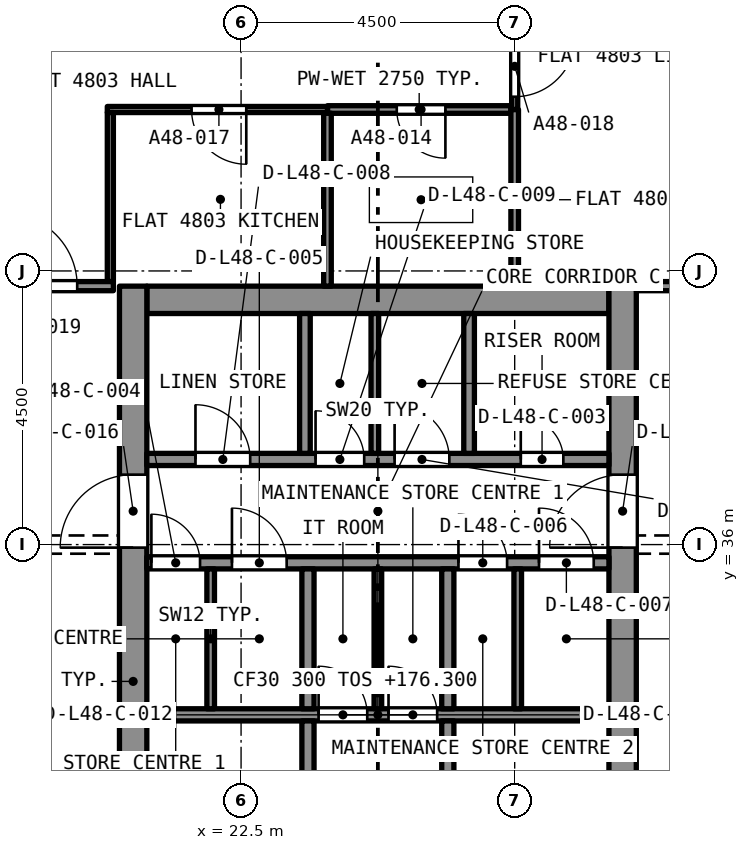
"""IFC4 building model, lengths in metres.
Left out: names, types, materials, properties, quantities, classifications, styles, units other than length and angle.
Written with IfcOpenShell. Run it as: python <this file> out.ifc"""

import sys

from ifc_helpers import new_model, si_unit, direction, frame, frame_2d, origin, place, context, subcontext, project, spatial, rectangle, extrude, element, fill, save


model = new_model("IFC4")
c1 = context("Model", 3, precision=1e-05, world=origin(), true_north=direction((0.0, 1.0)))
c2 = subcontext(c1, "Body", "Model", "MODEL_VIEW")
j1 = project(units=[si_unit("LENGTHUNIT", "METRE"), si_unit("PLANEANGLEUNIT", "RADIAN")], contexts=[c1])
p1 = place(None, origin())
s1 = spatial("IfcSite", under=j1, at=p1, CompositionType="ELEMENT")
p2 = place(p1, origin())
s2 = spatial("IfcBuilding", under=s1, at=p2, CompositionType="ELEMENT")
p3 = place(p2, frame((0.0, 0.0, 176.3)))
s3 = spatial("IfcBuildingStorey", under=s2, at=p3, CompositionType="ELEMENT", Elevation=176.3)
p4 = place(p3, frame((20.95, 40.025, 0.0), z_axis=(0.0, 0.0, 1.0), x_axis=(1.0, 0.0, 0.0)))
e1 = element("IfcWall", 1, at=p4, inside=s3, PredefinedType="SOLIDWALL", context=c2, shape_type="SweptSolid", body=[
    extrude(rectangle(XDim=7.6, YDim=0.45, at=frame_2d((3.8, 0.0))), origin(), (0.0, 0.0, 1.0), 3.2),
])
p5 = place(p3, frame((20.725, 27.25, 0.0), z_axis=(0.0, 0.0, 1.0), x_axis=(0.0, 1.0, 0.0)))
e2 = element("IfcWall", 2, at=p5, inside=s3, PredefinedType="SOLIDWALL", context=c2, shape_type="SweptSolid", body=[
    extrude(rectangle(XDim=13.0, YDim=0.45, at=frame_2d((6.5, 0.0))), origin(), (0.0, 0.0, 1.0), 3.2),
])
p6 = place(p5, frame((8.7, 0.0, 0.0)))
e3 = element("IfcOpeningElement", 3, at=p6, cuts=e2, PredefinedType="OPENING", context=c2, shape_type="SweptSolid", body=[
    extrude(rectangle(XDim=1.2, YDim=2.1, at=frame_2d((0.6, 1.05))), frame((0.0, 0.235, 0.0), z_axis=(0.0, -1.0, 0.0), x_axis=(1.0, 0.0, 0.0)), (0.0, 0.0, 1.0), 0.47),
])
p7 = place(p3, frame((28.775, 27.25, 0.0), z_axis=(0.0, 0.0, 1.0), x_axis=(0.0, 1.0, 0.0)))
e4 = element("IfcWall", 4, at=p7, inside=s3, PredefinedType="SOLIDWALL", context=c2, shape_type="SweptSolid", body=[
    extrude(rectangle(XDim=13.0, YDim=0.45, at=frame_2d((6.5, 0.0))), origin(), (0.0, 0.0, 1.0), 3.2),
])
p8 = place(p7, frame((8.7, 0.0, 0.0)))
e5 = element("IfcOpeningElement", 5, at=p8, cuts=e4, PredefinedType="OPENING", context=c2, shape_type="SweptSolid", body=[
    extrude(rectangle(XDim=1.2, YDim=2.1, at=frame_2d((0.6, 1.05))), frame((0.0, 0.235, 0.0), z_axis=(0.0, -1.0, 0.0), x_axis=(1.0, 0.0, 0.0)), (0.0, 0.0, 1.0), 0.47),
])
p9 = place(p3, frame((26.938, 43.155, 0.0), z_axis=(0.0, 0.0, 1.0), x_axis=(-1.0, 0.0, 0.0)))
e6 = element("IfcWall", 6, at=p9, inside=s3, PredefinedType="PARTITIONING", context=c2, shape_type="SweptSolid", body=[
    extrude(rectangle(XDim=3.016, YDim=0.125, at=frame_2d((1.508, 0.0))), origin(), (0.0, 0.0, 1.0), 2.75),
])
p10 = place(p9, frame((1.077, 0.0, 0.0)))
e7 = element("IfcOpeningElement", 7, at=p10, cuts=e6, PredefinedType="OPENING", context=c2, shape_type="SweptSolid", body=[
    extrude(rectangle(XDim=0.8, YDim=2.1, at=frame_2d((0.4, 1.05))), frame((0.0, 0.073, 0.0), z_axis=(0.0, -1.0, 0.0), x_axis=(1.0, 0.0, 0.0)), (0.0, 0.0, 1.0), 0.145),
])
p11 = place(p3, frame((23.921, 40.25, 0.0), z_axis=(0.0, 0.0, 1.0), x_axis=(0.0, 1.0, 0.0)))
e8 = element("IfcWall", 8, at=p11, inside=s3, PredefinedType="PARTITIONING", context=c2, shape_type="SweptSolid", body=[
    extrude(rectangle(XDim=2.843, YDim=0.125, at=frame_2d((1.421, 0.0))), origin(), (0.0, 0.0, 1.0), 2.75),
])
p12 = place(p3, frame((27.0, 40.25, 0.0), z_axis=(0.0, 0.0, 1.0), x_axis=(0.0, 1.0, 0.0)))
e9 = element("IfcWall", 9, at=p12, inside=s3, PredefinedType="PARTITIONING", context=c2, shape_type="SweptSolid", body=[
    extrude(rectangle(XDim=2.905, YDim=0.125, at=frame_2d((1.453, 0.0))), origin(), (0.0, 0.0, 1.0), 2.75),
])
p13 = place(p3, frame((23.921, 43.155, 0.0), z_axis=(0.0, 0.0, 1.0), x_axis=(-1.0, 0.0, 0.0)))
e10 = element("IfcWall", 10, at=p13, inside=s3, PredefinedType="PARTITIONING", context=c2, shape_type="SweptSolid", body=[
    extrude(rectangle(XDim=3.621, YDim=0.1, at=frame_2d((1.811, 0.0))), origin(), (0.0, 0.0, 1.0), 2.75),
])
p14 = place(p13, frame((1.335, 0.0, 0.0)))
e11 = element("IfcOpeningElement", 11, at=p14, cuts=e10, PredefinedType="OPENING", context=c2, shape_type="SweptSolid", body=[
    extrude(rectangle(XDim=0.9, YDim=2.1, at=frame_2d((0.45, 1.05))), frame((0.0, 0.06, 0.0), z_axis=(0.0, -1.0, 0.0), x_axis=(1.0, 0.0, 0.0)), (0.0, 0.0, 1.0), 0.12),
])
p15 = place(p3, frame((20.35, 40.325, 0.0), z_axis=(0.0, 0.0, 1.0), x_axis=(0.0, 1.0, 0.0)))
e12 = element("IfcWall", 12, at=p15, inside=s3, PredefinedType="PARTITIONING", context=c2, shape_type="SweptSolid", body=[
    extrude(rectangle(XDim=2.78, YDim=0.1, at=frame_2d((1.39, 0.0))), origin(), (0.0, 0.0, 1.0), 2.75),
])
p16 = place(p3, frame((27.0, 44.575, 0.0), z_axis=(0.0, 0.0, 1.0), x_axis=(0.0, -1.0, 0.0)))
e13 = element("IfcWall", 13, at=p16, inside=s3, PredefinedType="PARTITIONING", context=c2, shape_type="SweptSolid", body=[
    extrude(rectangle(XDim=1.42, YDim=0.1, at=frame_2d((0.71, 0.0))), origin(), (0.0, 0.0, 1.0), 2.75),
])
p17 = place(p16, frame((0.21, 0.0, 0.0)))
e14 = element("IfcOpeningElement", 14, at=p17, cuts=e13, PredefinedType="OPENING", context=c2, shape_type="SweptSolid", body=[
    extrude(rectangle(XDim=1.0, YDim=2.1, at=frame_2d((0.5, 1.05))), frame((0.0, 0.06, 0.0), z_axis=(0.0, -1.0, 0.0), x_axis=(1.0, 0.0, 0.0)), (0.0, 0.0, 1.0), 0.12),
])
p18 = place(p3, frame((18.475, 40.25, 0.0), z_axis=(0.0, 0.0, 1.0), x_axis=(1.0, 0.0, 0.0)))
e15 = element("IfcWall", 15, at=p18, inside=s3, PredefinedType="PARTITIONING", context=c2, shape_type="SweptSolid", body=[
    extrude(rectangle(XDim=1.925, YDim=0.15, at=frame_2d((0.962, 0.0))), origin(), (0.0, 0.0, 1.0), 2.75),
])
p19 = place(p18, frame((0.13, 0.0, 0.0)))
e16 = element("IfcOpeningElement", 16, at=p19, cuts=e15, PredefinedType="OPENING", context=c2, shape_type="SweptSolid", body=[
    extrude(rectangle(XDim=1.2, YDim=2.4, at=frame_2d((0.6, 1.2))), frame((0.0, 0.085, 0.0), z_axis=(0.0, -1.0, 0.0), x_axis=(1.0, 0.0, 0.0)), (0.0, 0.0, 1.0), 0.17),
])
p20 = place(p3, frame((29.0, 40.25, 0.0), z_axis=(0.0, 0.0, 1.0), x_axis=(1.0, 0.0, 0.0)))
e17 = element("IfcWall", 17, at=p20, inside=s3, PredefinedType="PARTITIONING", context=c2, shape_type="SweptSolid", body=[
    extrude(rectangle(XDim=2.025, YDim=0.15, at=frame_2d((1.012, 0.0))), origin(), (0.0, 0.0, 1.0), 2.75),
])
p21 = place(p3, frame((20.95, 33.2, 0.0), z_axis=(0.0, 0.0, 1.0), x_axis=(1.0, 0.0, 0.0)))
e18 = element("IfcWall", 18, at=p21, inside=s3, PredefinedType="SOLIDWALL", context=c2, shape_type="SweptSolid", body=[
    extrude(rectangle(XDim=7.6, YDim=0.2, at=frame_2d((3.8, 0.0))), origin(), (0.0, 0.0, 1.0), 2.9),
])
p22 = place(p21, frame((2.825, 0.0, 0.0)))
e19 = element("IfcOpeningElement", 19, at=p22, cuts=e18, PredefinedType="OPENING", context=c2, shape_type="SweptSolid", body=[
    extrude(rectangle(XDim=0.8, YDim=2.1, at=frame_2d((0.4, 1.05))), frame((0.0, 0.11, 0.0), z_axis=(0.0, -1.0, 0.0), x_axis=(1.0, 0.0, 0.0)), (0.0, 0.0, 1.0), 0.22),
])
p23 = place(p21, frame((3.975, 0.0, 0.0)))
e20 = element("IfcOpeningElement", 20, at=p23, cuts=e18, PredefinedType="OPENING", context=c2, shape_type="SweptSolid", body=[
    extrude(rectangle(XDim=0.8, YDim=2.1, at=frame_2d((0.4, 1.05))), frame((0.0, 0.11, 0.0), z_axis=(0.0, -1.0, 0.0), x_axis=(1.0, 0.0, 0.0)), (0.0, 0.0, 1.0), 0.22),
])
p24 = place(p3, frame((20.95, 35.7, 0.0), z_axis=(0.0, 0.0, 1.0), x_axis=(1.0, 0.0, 0.0)))
e21 = element("IfcWall", 21, at=p24, inside=s3, PredefinedType="SOLIDWALL", context=c2, shape_type="SweptSolid", body=[
    extrude(rectangle(XDim=7.6, YDim=0.2, at=frame_2d((3.8, 0.0))), origin(), (0.0, 0.0, 1.0), 2.9),
])
p25 = place(p24, frame((0.075, 0.0, 0.0)))
e22 = element("IfcOpeningElement", 22, at=p25, cuts=e21, PredefinedType="OPENING", context=c2, shape_type="SweptSolid", body=[
    extrude(rectangle(XDim=0.8, YDim=2.1, at=frame_2d((0.4, 1.05))), frame((0.0, 0.11, 0.0), z_axis=(0.0, -1.0, 0.0), x_axis=(1.0, 0.0, 0.0)), (0.0, 0.0, 1.0), 0.22),
])
p26 = place(p24, frame((1.4, 0.0, 0.0)))
e23 = element("IfcOpeningElement", 23, at=p26, cuts=e21, PredefinedType="OPENING", context=c2, shape_type="SweptSolid", body=[
    extrude(rectangle(XDim=0.9, YDim=2.1, at=frame_2d((0.45, 1.05))), frame((0.0, 0.11, 0.0), z_axis=(0.0, -1.0, 0.0), x_axis=(1.0, 0.0, 0.0)), (0.0, 0.0, 1.0), 0.22),
])
p27 = place(p24, frame((5.125, 0.0, 0.0)))
e24 = element("IfcOpeningElement", 24, at=p27, cuts=e21, PredefinedType="OPENING", context=c2, shape_type="SweptSolid", body=[
    extrude(rectangle(XDim=0.8, YDim=2.1, at=frame_2d((0.4, 1.05))), frame((0.0, 0.11, 0.0), z_axis=(0.0, -1.0, 0.0), x_axis=(1.0, 0.0, 0.0)), (0.0, 0.0, 1.0), 0.22),
])
p28 = place(p24, frame((6.45, 0.0, 0.0)))
e25 = element("IfcOpeningElement", 25, at=p28, cuts=e21, PredefinedType="OPENING", context=c2, shape_type="SweptSolid", body=[
    extrude(rectangle(XDim=0.9, YDim=2.1, at=frame_2d((0.45, 1.05))), frame((0.0, 0.11, 0.0), z_axis=(0.0, -1.0, 0.0), x_axis=(1.0, 0.0, 0.0)), (0.0, 0.0, 1.0), 0.22),
])
p29 = place(p3, frame((20.95, 37.4, 0.0), z_axis=(0.0, 0.0, 1.0), x_axis=(1.0, 0.0, 0.0)))
e26 = element("IfcWall", 26, at=p29, inside=s3, PredefinedType="SOLIDWALL", context=c2, shape_type="SweptSolid", body=[
    extrude(rectangle(XDim=7.6, YDim=0.2, at=frame_2d((3.8, 0.0))), origin(), (0.0, 0.0, 1.0), 2.9),
])
p30 = place(p29, frame((6.15, 0.0, 0.0)))
e27 = element("IfcOpeningElement", 27, at=p30, cuts=e26, PredefinedType="OPENING", context=c2, shape_type="SweptSolid", body=[
    extrude(rectangle(XDim=0.7, YDim=2.1, at=frame_2d((0.35, 1.05))), frame((0.0, 0.11, 0.0), z_axis=(0.0, -1.0, 0.0), x_axis=(1.0, 0.0, 0.0)), (0.0, 0.0, 1.0), 0.22),
])
p31 = place(p29, frame((0.8, 0.0, 0.0)))
e28 = element("IfcOpeningElement", 28, at=p31, cuts=e26, PredefinedType="OPENING", context=c2, shape_type="SweptSolid", body=[
    extrude(rectangle(XDim=0.9, YDim=2.1, at=frame_2d((0.45, 1.05))), frame((0.0, 0.11, 0.0), z_axis=(0.0, -1.0, 0.0), x_axis=(1.0, 0.0, 0.0)), (0.0, 0.0, 1.0), 0.22),
])
p32 = place(p29, frame((2.775, 0.0, 0.0)))
e29 = element("IfcOpeningElement", 29, at=p32, cuts=e26, PredefinedType="OPENING", context=c2, shape_type="SweptSolid", body=[
    extrude(rectangle(XDim=0.8, YDim=2.1, at=frame_2d((0.4, 1.05))), frame((0.0, 0.11, 0.0), z_axis=(0.0, -1.0, 0.0), x_axis=(1.0, 0.0, 0.0)), (0.0, 0.0, 1.0), 0.22),
])
p33 = place(p29, frame((4.075, 0.0, 0.0)))
e30 = element("IfcOpeningElement", 30, at=p33, cuts=e26, PredefinedType="OPENING", context=c2, shape_type="SweptSolid", body=[
    extrude(rectangle(XDim=0.9, YDim=2.1, at=frame_2d((0.45, 1.05))), frame((0.0, 0.11, 0.0), z_axis=(0.0, -1.0, 0.0), x_axis=(1.0, 0.0, 0.0)), (0.0, 0.0, 1.0), 0.22),
])
p34 = place(p3, frame((23.6, 27.7, 0.0), z_axis=(0.0, 0.0, 1.0), x_axis=(0.0, 1.0, 0.0)))
e31 = element("IfcWall", 31, at=p34, inside=s3, PredefinedType="SOLIDWALL", context=c2, shape_type="SweptSolid", body=[
    extrude(rectangle(XDim=5.4, YDim=0.2, at=frame_2d((2.7, 0.0))), origin(), (0.0, 0.0, 1.0), 2.9),
])
p35 = place(p34, frame((0.2, 0.0, 0.0)))
e32 = element("IfcOpeningElement", 32, at=p35, cuts=e31, PredefinedType="OPENING", context=c2, shape_type="SweptSolid", body=[
    extrude(rectangle(XDim=0.9, YDim=2.1, at=frame_2d((0.45, 1.05))), frame((0.0, 0.11, 0.0), z_axis=(0.0, -1.0, 0.0), x_axis=(1.0, 0.0, 0.0)), (0.0, 0.0, 1.0), 0.22),
])
p36 = place(p3, frame((25.9, 27.7, 0.0), z_axis=(0.0, 0.0, 1.0), x_axis=(0.0, 1.0, 0.0)))
e33 = element("IfcWall", 33, at=p36, inside=s3, PredefinedType="SOLIDWALL", context=c2, shape_type="SweptSolid", body=[
    extrude(rectangle(XDim=5.4, YDim=0.2, at=frame_2d((2.7, 0.0))), origin(), (0.0, 0.0, 1.0), 2.9),
])
p37 = place(p36, frame((0.2, 0.0, 0.0)))
e34 = element("IfcOpeningElement", 34, at=p37, cuts=e33, PredefinedType="OPENING", context=c2, shape_type="SweptSolid", body=[
    extrude(rectangle(XDim=0.9, YDim=2.1, at=frame_2d((0.45, 1.05))), frame((0.0, 0.11, 0.0), z_axis=(0.0, -1.0, 0.0), x_axis=(1.0, 0.0, 0.0)), (0.0, 0.0, 1.0), 0.22),
])
for number, where, z_axis, x_axis in (
    (35, (23.6, 33.3, 0.0), (0.0, 0.0, 1.0), (0.0, 1.0, 0.0)),
    (36, (25.9, 33.3, 0.0), (0.0, 0.0, 1.0), (0.0, 1.0, 0.0)),
):
    element("IfcWall", number, at=place(p3, frame(where, z_axis=z_axis, x_axis=x_axis)), inside=s3, PredefinedType="SOLIDWALL", context=c2, shape_type="SweptSolid", body=[
        extrude(rectangle(XDim=2.3, YDim=0.2, at=frame_2d((1.15, 0.0))), origin(), (0.0, 0.0, 1.0), 2.9),
    ])
for number, where, z_axis, x_axis in (
    (37, (23.55, 37.5, 0.0), (0.0, 0.0, 1.0), (0.0, 1.0, 0.0)),
    (38, (26.25, 37.5, 0.0), (0.0, 0.0, 1.0), (0.0, 1.0, 0.0)),
):
    element("IfcWall", number, at=place(p3, frame(where, z_axis=z_axis, x_axis=x_axis)), inside=s3, PredefinedType="SOLIDWALL", context=c2, shape_type="SweptSolid", body=[
        extrude(rectangle(XDim=2.3, YDim=0.175, at=frame_2d((1.15, 0.0))), origin(), (0.0, 0.0, 1.0), 2.9),
    ])
for number, where, z_axis, x_axis in (
    (39, (22.0, 33.3, 0.0), (0.0, 0.0, 1.0), (0.0, 1.0, 0.0)),
    (40, (27.05, 33.3, 0.0), (0.0, 0.0, 1.0), (0.0, 1.0, 0.0)),
    (41, (24.7, 37.5, 0.0), (0.0, 0.0, 1.0), (0.0, 1.0, 0.0)),
    (42, (24.75, 33.3, 0.0), (0.0, 0.0, 1.0), (0.0, 1.0, 0.0)),
):
    element("IfcWall", number, at=place(p3, frame(where, z_axis=z_axis, x_axis=x_axis)), inside=s3, PredefinedType="PARTITIONING", context=c2, shape_type="SweptSolid", body=[
        extrude(rectangle(XDim=2.3, YDim=0.125, at=frame_2d((1.15, 0.0))), origin(), (0.0, 0.0, 1.0), 2.9),
    ])
p38 = place(p10, origin())
e43 = element("IfcDoor", 43, at=p38, inside=s3, OperationType="SINGLE_SWING_LEFT", PredefinedType="DOOR", context=c2, shape_type="SweptSolid", body=[
    extrude(rectangle(XDim=0.8, YDim=2.1, at=frame_2d((0.4, 1.05))), frame((0.0, 0.025, 0.0), z_axis=(0.0, -1.0, 0.0), x_axis=(1.0, 0.0, 0.0)), (0.0, 0.0, 1.0), 0.05),
])
fill(e7, e43)
p39 = place(p14, origin())
e44 = element("IfcDoor", 44, at=p39, inside=s3, OperationType="SINGLE_SWING_LEFT", PredefinedType="DOOR", context=c2, shape_type="SweptSolid", body=[
    extrude(rectangle(XDim=0.9, YDim=2.1, at=frame_2d((0.45, 1.05))), frame((0.0, 0.025, 0.0), z_axis=(0.0, -1.0, 0.0), x_axis=(1.0, 0.0, 0.0)), (0.0, 0.0, 1.0), 0.05),
])
fill(e11, e44)
p40 = place(p17, origin())
e45 = element("IfcDoor", 45, at=p40, inside=s3, OperationType="SINGLE_SWING_RIGHT", PredefinedType="DOOR", context=c2, shape_type="SweptSolid", body=[
    extrude(rectangle(XDim=1.0, YDim=2.1, at=frame_2d((0.5, 1.05))), frame((0.0, 0.025, 0.0), z_axis=(0.0, -1.0, 0.0), x_axis=(1.0, 0.0, 0.0)), (0.0, 0.0, 1.0), 0.05),
])
fill(e14, e45)
p41 = place(p19, origin())
e46 = element("IfcDoor", 46, at=p41, inside=s3, OperationType="SINGLE_SWING_LEFT", PredefinedType="DOOR", context=c2, shape_type="SweptSolid", body=[
    extrude(rectangle(XDim=1.2, YDim=2.4, at=frame_2d((0.6, 1.2))), frame((0.0, 0.025, 0.0), z_axis=(0.0, -1.0, 0.0), x_axis=(1.0, 0.0, 0.0)), (0.0, 0.0, 1.0), 0.05),
])
fill(e16, e46)
p42 = place(p30, origin())
e47 = element("IfcDoor", 47, at=p42, inside=s3, OperationType="SINGLE_SWING_LEFT", PredefinedType="DOOR", context=c2, shape_type="SweptSolid", body=[
    extrude(rectangle(XDim=0.7, YDim=2.1, at=frame_2d((0.35, 1.05))), frame((0.0, 0.025, 0.0), z_axis=(0.0, -1.0, 0.0), x_axis=(1.0, 0.0, 0.0)), (0.0, 0.0, 1.0), 0.05),
])
fill(e27, e47)
p43 = place(p25, origin())
e48 = element("IfcDoor", 48, at=p43, inside=s3, OperationType="SINGLE_SWING_LEFT", PredefinedType="DOOR", context=c2, shape_type="SweptSolid", body=[
    extrude(rectangle(XDim=0.8, YDim=2.1, at=frame_2d((0.4, 1.05))), frame((0.0, 0.025, 0.0), z_axis=(0.0, -1.0, 0.0), x_axis=(1.0, 0.0, 0.0)), (0.0, 0.0, 1.0), 0.05),
])
fill(e22, e48)
p44 = place(p26, origin())
e49 = element("IfcDoor", 49, at=p44, inside=s3, OperationType="SINGLE_SWING_LEFT", PredefinedType="DOOR", context=c2, shape_type="SweptSolid", body=[
    extrude(rectangle(XDim=0.9, YDim=2.1, at=frame_2d((0.45, 1.05))), frame((0.0, 0.025, 0.0), z_axis=(0.0, -1.0, 0.0), x_axis=(1.0, 0.0, 0.0)), (0.0, 0.0, 1.0), 0.05),
])
fill(e23, e49)
p45 = place(p27, origin())
e50 = element("IfcDoor", 50, at=p45, inside=s3, OperationType="SINGLE_SWING_LEFT", PredefinedType="DOOR", context=c2, shape_type="SweptSolid", body=[
    extrude(rectangle(XDim=0.8, YDim=2.1, at=frame_2d((0.4, 1.05))), frame((0.0, 0.025, 0.0), z_axis=(0.0, -1.0, 0.0), x_axis=(1.0, 0.0, 0.0)), (0.0, 0.0, 1.0), 0.05),
])
fill(e24, e50)
p46 = place(p28, origin())
e51 = element("IfcDoor", 51, at=p46, inside=s3, OperationType="SINGLE_SWING_LEFT", PredefinedType="DOOR", context=c2, shape_type="SweptSolid", body=[
    extrude(rectangle(XDim=0.9, YDim=2.1, at=frame_2d((0.45, 1.05))), frame((0.0, 0.025, 0.0), z_axis=(0.0, -1.0, 0.0), x_axis=(1.0, 0.0, 0.0)), (0.0, 0.0, 1.0), 0.05),
])
fill(e25, e51)
p47 = place(p31, origin())
e52 = element("IfcDoor", 52, at=p47, inside=s3, OperationType="SINGLE_SWING_LEFT", PredefinedType="DOOR", context=c2, shape_type="SweptSolid", body=[
    extrude(rectangle(XDim=0.9, YDim=2.1, at=frame_2d((0.45, 1.05))), frame((0.0, 0.025, 0.0), z_axis=(0.0, -1.0, 0.0), x_axis=(1.0, 0.0, 0.0)), (0.0, 0.0, 1.0), 0.05),
])
fill(e28, e52)
p48 = place(p32, origin())
e53 = element("IfcDoor", 53, at=p48, inside=s3, OperationType="SINGLE_SWING_LEFT", PredefinedType="DOOR", context=c2, shape_type="SweptSolid", body=[
    extrude(rectangle(XDim=0.8, YDim=2.1, at=frame_2d((0.4, 1.05))), frame((0.0, 0.025, 0.0), z_axis=(0.0, -1.0, 0.0), x_axis=(1.0, 0.0, 0.0)), (0.0, 0.0, 1.0), 0.05),
])
fill(e29, e53)
p49 = place(p33, origin())
e54 = element("IfcDoor", 54, at=p49, inside=s3, OperationType="SINGLE_SWING_LEFT", PredefinedType="DOOR", context=c2, shape_type="SweptSolid", body=[
    extrude(rectangle(XDim=0.9, YDim=2.1, at=frame_2d((0.45, 1.05))), frame((0.0, 0.025, 0.0), z_axis=(0.0, -1.0, 0.0), x_axis=(1.0, 0.0, 0.0)), (0.0, 0.0, 1.0), 0.05),
])
fill(e30, e54)
p50 = place(p22, origin())
e55 = element("IfcDoor", 55, at=p50, inside=s3, OperationType="SINGLE_SWING_LEFT", PredefinedType="DOOR", context=c2, shape_type="SweptSolid", body=[
    extrude(rectangle(XDim=0.8, YDim=2.1, at=frame_2d((0.4, 1.05))), frame((0.0, 0.025, 0.0), z_axis=(0.0, -1.0, 0.0), x_axis=(1.0, 0.0, 0.0)), (0.0, 0.0, 1.0), 0.05),
])
fill(e19, e55)
p51 = place(p23, origin())
e56 = element("IfcDoor", 56, at=p51, inside=s3, OperationType="SINGLE_SWING_LEFT", PredefinedType="DOOR", context=c2, shape_type="SweptSolid", body=[
    extrude(rectangle(XDim=0.8, YDim=2.1, at=frame_2d((0.4, 1.05))), frame((0.0, 0.025, 0.0), z_axis=(0.0, -1.0, 0.0), x_axis=(1.0, 0.0, 0.0)), (0.0, 0.0, 1.0), 0.05),
])
fill(e20, e56)
p52 = place(p6, origin())
e57 = element("IfcDoor", 57, at=p52, inside=s3, OperationType="SINGLE_SWING_LEFT", PredefinedType="DOOR", context=c2, shape_type="SweptSolid", body=[
    extrude(rectangle(XDim=1.2, YDim=2.1, at=frame_2d((0.6, 1.05))), frame((0.0, 0.025, 0.0), z_axis=(0.0, -1.0, 0.0), x_axis=(1.0, 0.0, 0.0)), (0.0, 0.0, 1.0), 0.05),
])
fill(e3, e57)
p53 = place(p8, origin())
e58 = element("IfcDoor", 58, at=p53, inside=s3, OperationType="SINGLE_SWING_LEFT", PredefinedType="DOOR", context=c2, shape_type="SweptSolid", body=[
    extrude(rectangle(XDim=1.2, YDim=2.1, at=frame_2d((0.6, 1.05))), frame((0.0, 0.025, 0.0), z_axis=(0.0, -1.0, 0.0), x_axis=(1.0, 0.0, 0.0)), (0.0, 0.0, 1.0), 0.05),
])
fill(e5, e58)
save(model, sys.argv[1])
